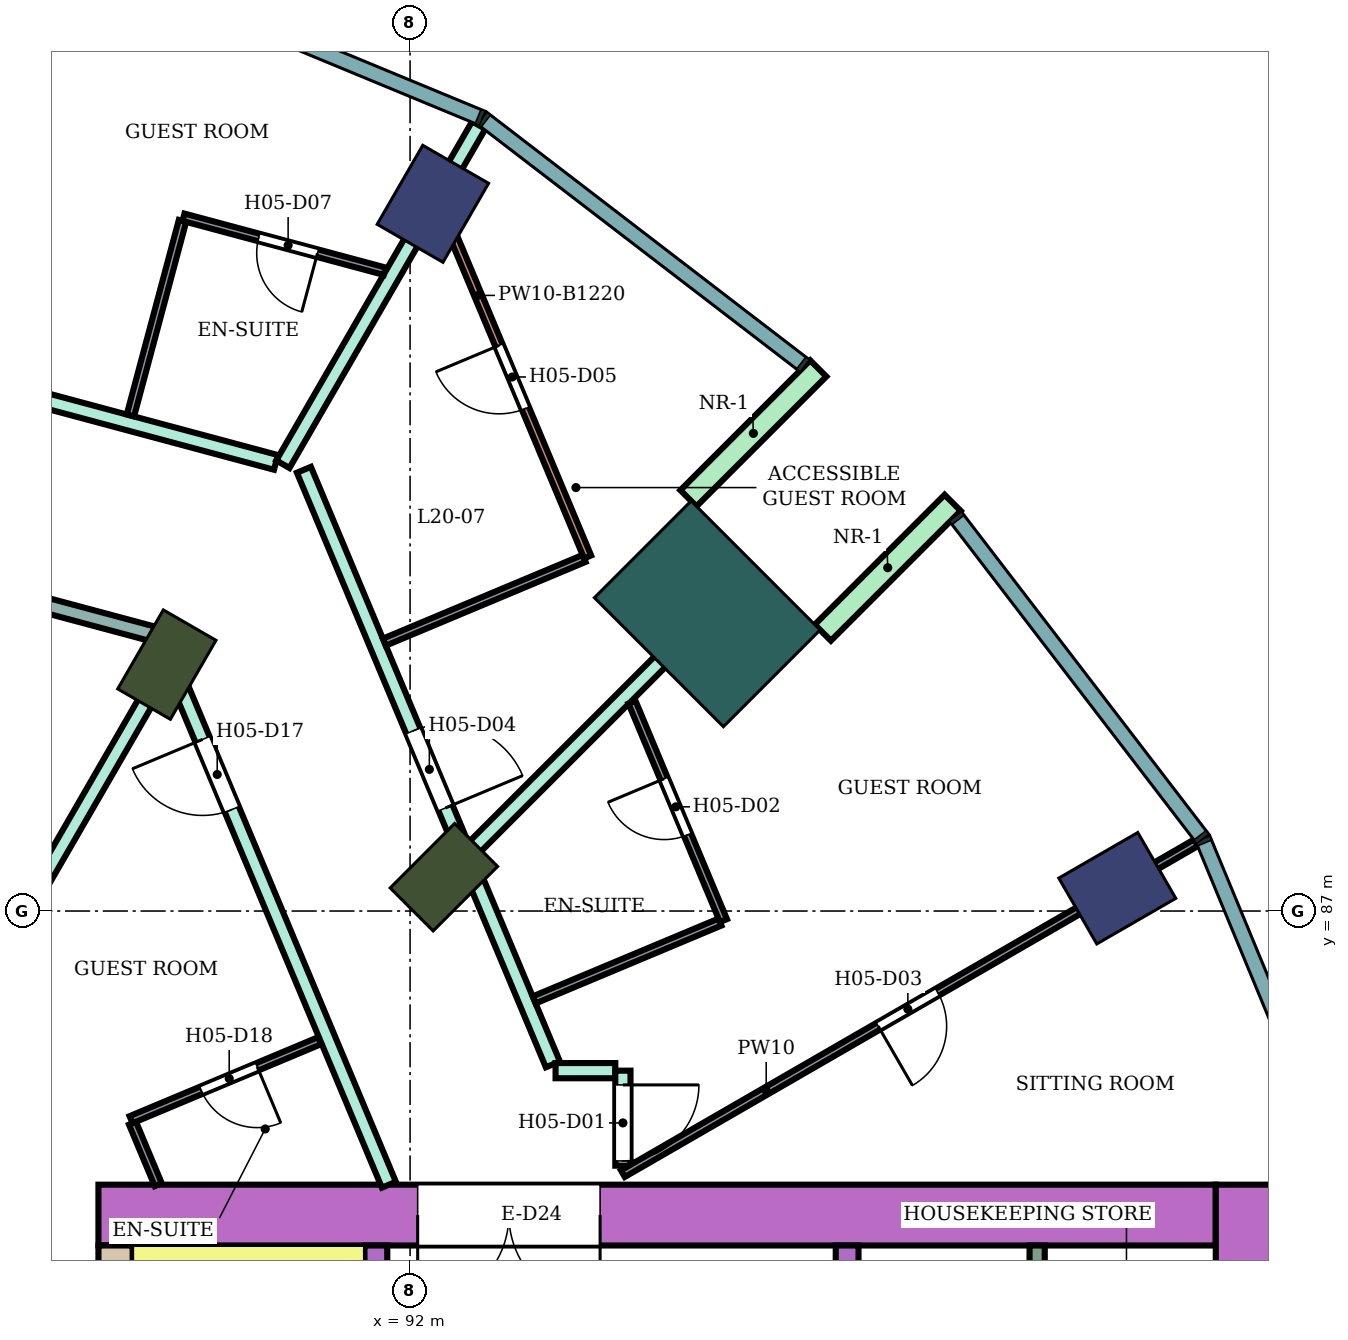
"""IFC4 building model, lengths in metres.
Left out: names, types, materials, properties, quantities, classifications, styles, units other than length and angle.
Written with IfcOpenShell. Run it as: python <this file> out.ifc"""

import sys

from ifc_helpers import new_model, si_unit, direction, frame, frame_2d, origin, origin_2d, place, context, subcontext, project, spatial, rectangle, extrude, element, fill, save


model = new_model("IFC4")
c1 = context("Model", 3, precision=1e-05, world=origin(), true_north=direction((0.0, 1.0)))
c2 = subcontext(c1, "Body", "Model", "MODEL_VIEW")
j1 = project(units=[si_unit("LENGTHUNIT", "METRE"), si_unit("PLANEANGLEUNIT", "RADIAN")], contexts=[c1])
p1 = place(None, origin())
s1 = spatial("IfcSite", under=j1, at=p1, CompositionType="ELEMENT")
p2 = place(p1, origin())
s2 = spatial("IfcBuilding", under=s1, at=p2, CompositionType="ELEMENT")
p3 = place(p2, frame((0.0, 0.0, 90.0)))
s3 = spatial("IfcBuildingStorey", under=s2, at=p3, CompositionType="ELEMENT", Elevation=90.0)
for number, where, z_axis, x_axis in (
    (1, (101.304, 87.3, 0.0), (0.0, 0.0, 1.0), (0.866, 0.5, 0.0)),
    (2, (92.3, 96.304, 0.0), (0.0, 0.0, 1.0), (0.5, 0.866, 0.0)),
):
    element("IfcColumn", number, at=place(p3, frame(where, z_axis=z_axis, x_axis=x_axis)), inside=s3, PredefinedType="COLUMN", context=c2, shape_type="SweptSolid", body=[
        extrude(rectangle(XDim=1.2, YDim=1.0, at=origin_2d()), origin(), (0.0, 0.0, 1.0), 3.8),
    ])
for number, where, z_axis, x_axis in (
    (3, (92.445, 87.445, 0.0), (0.0, 0.0, 1.0), (0.707, 0.707, 0.0)),
    (4, (88.8, 90.242, 0.0), (0.0, 0.0, 1.0), (0.5, 0.866, 0.0)),
):
    element("IfcColumn", number, at=place(p3, frame(where, z_axis=z_axis, x_axis=x_axis)), inside=s3, PredefinedType="COLUMN", context=c2, shape_type="SweptSolid", body=[
        extrude(rectangle(XDim=1.2, YDim=0.8, at=origin_2d()), origin(), (0.0, 0.0, 1.0), 3.8),
    ])
p4 = place(p3, frame((95.91, 90.91, 0.0), z_axis=(0.0, 0.0, 1.0), x_axis=(0.707106781187, 0.707106781187, 0.0)))
e5 = element("IfcColumn", 5, at=p4, inside=s3, PredefinedType="COLUMN", context=c2, shape_type="SweptSolid", body=[
    extrude(rectangle(XDim=1.8, YDim=2.4, at=origin_2d()), origin(), (0.0, 0.0, 1.0), 3.8),
])
p5 = place(p3, frame((87.9, 83.0, 0.0), z_axis=(0.0, 0.0, 1.0), x_axis=(1.0, 0.0, 0.0)))
e6 = element("IfcWall", 6, at=p5, inside=s3, PredefinedType="SHEAR", context=c2, shape_type="SweptSolid", body=[
    extrude(rectangle(XDim=14.7, YDim=0.8, at=frame_2d((7.35, 0.0))), origin(), (0.0, 0.0, 1.0), 3.48),
])
p6 = place(p5, frame((4.2, 0.0, 0.0)))
e7 = element("IfcOpeningElement", 7, at=p6, cuts=e6, PredefinedType="OPENING", context=c2, shape_type="SweptSolid", body=[
    extrude(rectangle(XDim=2.4, YDim=2.4, at=frame_2d((1.2, 1.2))), frame((0.0, 0.41, 0.0), z_axis=(0.0, -1.0, 0.0), x_axis=(1.0, 0.0, 0.0)), (0.0, 0.0, 1.0), 0.82),
])
p7 = place(p3, frame((88.125, 75.0, 0.0), z_axis=(0.0, 0.0, 1.0), x_axis=(0.0, 1.0, 0.0)))
e8 = element("IfcWall", 8, at=p7, inside=s3, PredefinedType="SHEAR", context=c2, shape_type="SweptSolid", body=[
    extrude(rectangle(XDim=7.6, YDim=0.45, at=frame_2d((3.8, 0.0))), origin(), (0.0, 0.0, 1.0), 3.48),
])
p8 = place(p3, frame((103.0, 66.6, 0.0), z_axis=(0.0, 0.0, 1.0), x_axis=(0.0, 1.0, 0.0)))
e9 = element("IfcWall", 9, at=p8, inside=s3, PredefinedType="SHEAR", context=c2, shape_type="SweptSolid", body=[
    extrude(rectangle(XDim=16.8, YDim=0.8, at=frame_2d((8.4, 0.0))), origin(), (0.0, 0.0, 1.0), 3.48),
])
p9 = place(p3, frame((91.55, 75.0, 0.0), z_axis=(0.0, 0.0, 1.0), x_axis=(0.0, 1.0, 0.0)))
e10 = element("IfcWall", 10, at=p9, inside=s3, PredefinedType="SHEAR", context=c2, shape_type="SweptSolid", body=[
    extrude(rectangle(XDim=7.6, YDim=0.3, at=frame_2d((3.8, 0.0))), origin(), (0.0, 0.0, 1.0), 3.48),
])
p10 = place(p9, frame((1.85, 0.0, 0.0)))
e11 = element("IfcOpeningElement", 11, at=p10, cuts=e10, PredefinedType="OPENING", context=c2, shape_type="SweptSolid", body=[
    extrude(rectangle(XDim=0.9, YDim=2.1, at=frame_2d((0.45, 1.05))), frame((0.0, 0.16, 0.0), z_axis=(0.0, -1.0, 0.0), x_axis=(1.0, 0.0, 0.0)), (0.0, 0.0, 1.0), 0.32),
])
p11 = place(p3, frame((97.75, 78.75, 0.0), z_axis=(0.0, 0.0, 1.0), x_axis=(0.0, 1.0, 0.0)))
e12 = element("IfcWall", 12, at=p11, inside=s3, PredefinedType="SHEAR", context=c2, shape_type="SweptSolid", body=[
    extrude(rectangle(XDim=3.85, YDim=0.3, at=frame_2d((1.925, 0.0))), origin(), (0.0, 0.0, 1.0), 3.48),
])
for number, where, z_axis, x_axis in (
    (13, (97.43, 90.662, 0.0), (0.0, 0.0, 1.0), (0.707, 0.707, 0.0)),
    (14, (95.662, 92.43, 0.0), (0.0, 0.0, 1.0), (0.707, 0.707, 0.0)),
):
    element("IfcWall", number, at=place(p3, frame(where, z_axis=z_axis, x_axis=x_axis)), inside=s3, PredefinedType="NOTDEFINED", context=c2, shape_type="SweptSolid", body=[
        extrude(rectangle(XDim=2.416, YDim=0.3, at=frame_2d((1.208, 0.0))), origin(), (0.0, 0.0, 1.0), 3.8),
    ])
p12 = place(p3, frame((80.0, 92.954, 0.0), z_axis=(0.0, 0.0, 1.0), x_axis=(0.965932194462, -0.258795277586, 0.0)))
e15 = element("IfcWall", 15, at=p12, inside=s3, PredefinedType="PARTITIONING", context=c2, shape_type="SweptSolid", body=[
    extrude(rectangle(XDim=8.934, YDim=0.2, at=frame_2d((4.467, 0.0))), origin(), (0.0, 0.0, 1.0), 2.98),
])
p13 = place(p12, frame((3.302, 0.0, 0.0)))
e16 = element("IfcOpeningElement", 16, at=p13, cuts=e15, PredefinedType="OPENING", context=c2, shape_type="SweptSolid", body=[
    extrude(rectangle(XDim=0.9, YDim=2.1, at=frame_2d((0.45, 1.05))), frame((0.0, 0.11, 0.0), z_axis=(0.0, -1.0, 0.0), x_axis=(1.0, 0.0, 0.0)), (0.0, 0.0, 1.0), 0.22),
])
p14 = place(p3, frame((80.0, 95.648, 0.0), z_axis=(0.0, 0.0, 1.0), x_axis=(0.965852259202, -0.259093445292, 0.0)))
e17 = element("IfcWall", 17, at=p14, inside=s3, PredefinedType="PARTITIONING", context=c2, shape_type="SweptSolid", body=[
    extrude(rectangle(XDim=10.597, YDim=0.2, at=frame_2d((5.298, 0.0))), origin(), (0.0, 0.0, 1.0), 3.35),
])
p15 = place(p14, frame((5.875, 0.0, 0.0)))
e18 = element("IfcOpeningElement", 18, at=p15, cuts=e17, PredefinedType="OPENING", context=c2, shape_type="SweptSolid", body=[
    extrude(rectangle(XDim=1.0, YDim=2.1, at=frame_2d((0.5, 1.05))), frame((0.0, 0.11, 0.0), z_axis=(0.0, -1.0, 0.0), x_axis=(1.0, 0.0, 0.0)), (0.0, 0.0, 1.0), 0.22),
])
p16 = place(p3, frame((83.85, 81.667, 0.0), z_axis=(0.0, 0.0, 1.0), x_axis=(0.500222212082, 0.865897071562, 0.0)))
e19 = element("IfcWall", 19, at=p16, inside=s3, PredefinedType="PARTITIONING", context=c2, shape_type="SweptSolid", body=[
    extrude(rectangle(XDim=9.768, YDim=0.2, at=frame_2d((4.884, 0.0))), origin(), (0.0, 0.0, 1.0), 3.35),
])
p17 = place(p3, frame((88.698, 90.624, 0.0), z_axis=(0.0, 0.0, 1.0), x_axis=(0.386027055918, -0.922487459047, 0.0)))
e20 = element("IfcWall", 20, at=p17, inside=s3, PredefinedType="PARTITIONING", context=c2, shape_type="SweptSolid", body=[
    extrude(rectangle(XDim=7.832, YDim=0.2, at=frame_2d((3.916, 0.0))), origin(), (0.0, 0.0, 1.0), 3.35),
])
p18 = place(p17, frame((1.482, 0.0, 0.0)))
e21 = element("IfcOpeningElement", 21, at=p18, cuts=e20, PredefinedType="OPENING", context=c2, shape_type="SweptSolid", body=[
    extrude(rectangle(XDim=1.0, YDim=2.1, at=frame_2d((0.5, 1.05))), frame((0.0, 0.11, 0.0), z_axis=(0.0, -1.0, 0.0), x_axis=(1.0, 0.0, 0.0)), (0.0, 0.0, 1.0), 0.22),
])
p19 = place(p3, frame((90.327, 92.878, 0.0), z_axis=(0.0, 0.0, 1.0), x_axis=(0.50022153717, 0.865897461453, 0.0)))
e22 = element("IfcWall", 22, at=p19, inside=s3, PredefinedType="PARTITIONING", context=c2, shape_type="SweptSolid", body=[
    extrude(rectangle(XDim=5.152, YDim=0.2, at=frame_2d((2.576, 0.0))), origin(), (0.0, 0.0, 1.0), 3.35),
])
p20 = place(p3, frame((90.604, 92.805, 0.0), z_axis=(0.0, 0.0, 1.0), x_axis=(0.386209298583, -0.922411176042, 0.0)))
e23 = element("IfcWall", 23, at=p20, inside=s3, PredefinedType="PARTITIONING", context=c2, shape_type="SweptSolid", body=[
    extrude(rectangle(XDim=8.48, YDim=0.2, at=frame_2d((4.24, 0.0))), origin(), (0.0, 0.0, 1.0), 3.35),
])
p21 = place(p20, frame((3.723, 0.0, 0.0)))
e24 = element("IfcOpeningElement", 24, at=p21, cuts=e23, PredefinedType="OPENING", context=c2, shape_type="SweptSolid", body=[
    extrude(rectangle(XDim=1.1, YDim=2.1, at=frame_2d((0.55, 1.05))), frame((0.0, 0.11, 0.0), z_axis=(0.0, -1.0, 0.0), x_axis=(1.0, 0.0, 0.0)), (0.0, 0.0, 1.0), 0.22),
])
p22 = place(p3, frame((92.832, 87.824, 0.0), z_axis=(0.0, 0.0, 1.0), x_axis=(0.707251566381, 0.70696196634, 0.0)))
e25 = element("IfcWall", 25, at=p22, inside=s3, PredefinedType="PARTITIONING", context=c2, shape_type="SweptSolid", body=[
    extrude(rectangle(XDim=5.058, YDim=0.2, at=frame_2d((2.529, 0.0))), origin(), (0.0, 0.0, 1.0), 3.35),
])
p23 = place(p3, frame((93.914, 84.9, 0.0), z_axis=(0.0, 0.0, 1.0), x_axis=(1.0, 0.0, 0.0)))
e26 = element("IfcWall", 26, at=p23, inside=s3, PredefinedType="PARTITIONING", context=c2, shape_type="SweptSolid", body=[
    extrude(rectangle(XDim=0.786, YDim=0.2, at=frame_2d((0.393, 0.0))), origin(), (0.0, 0.0, 1.0), 3.35),
])
p24 = place(p3, frame((94.8, 83.65, 0.0), z_axis=(0.0, 0.0, 1.0), x_axis=(0.0, 1.0, 0.0)))
e27 = element("IfcWall", 27, at=p24, inside=s3, PredefinedType="PARTITIONING", context=c2, shape_type="SweptSolid", body=[
    extrude(rectangle(XDim=1.25, YDim=0.2, at=frame_2d((0.625, 0.0))), origin(), (0.0, 0.0, 1.0), 3.35),
])
p25 = place(p24, frame((0.062, 0.0, 0.0)))
e28 = element("IfcOpeningElement", 28, at=p25, cuts=e27, PredefinedType="OPENING", context=c2, shape_type="SweptSolid", body=[
    extrude(rectangle(XDim=1.0, YDim=2.1, at=frame_2d((0.5, 1.05))), frame((0.0, 0.11, 0.0), z_axis=(0.0, -1.0, 0.0), x_axis=(1.0, 0.0, 0.0)), (0.0, 0.0, 1.0), 0.22),
])
p26 = place(p3, frame((88.321, 93.521, 0.0), z_axis=(0.0, 0.0, 1.0), x_axis=(0.258677737588, 0.965963678446, 0.0)))
e29 = element("IfcWall", 29, at=p26, inside=s3, PredefinedType="PARTITIONING", context=c2, shape_type="SweptSolid", body=[
    extrude(rectangle(XDim=2.649, YDim=0.1, at=frame_2d((1.325, 0.0))), origin(), (0.0, 0.0, 1.0), 3.35),
])
p27 = place(p3, frame((88.348, 84.209, 0.0), z_axis=(0.0, 0.0, 1.0), x_axis=(0.386077497504, -0.922466349479, 0.0)))
e30 = element("IfcWall", 30, at=p27, inside=s3, PredefinedType="PARTITIONING", context=c2, shape_type="SweptSolid", body=[
    extrude(rectangle(XDim=0.877, YDim=0.1, at=frame_2d((0.438, 0.0))), origin(), (0.0, 0.0, 1.0), 3.35),
])
p28 = place(p3, frame((88.329, 84.255, 0.0), z_axis=(0.0, 0.0, 1.0), x_axis=(0.922320663728, 0.386425404522, 0.0)))
e31 = element("IfcWall", 31, at=p28, inside=s3, PredefinedType="PARTITIONING", context=c2, shape_type="SweptSolid", body=[
    extrude(rectangle(XDim=2.69, YDim=0.1, at=frame_2d((1.345, 0.0))), origin(), (0.0, 0.0, 1.0), 3.35),
])
p29 = place(p28, frame((1.0, 0.0, 0.0)))
e32 = element("IfcOpeningElement", 32, at=p29, cuts=e31, PredefinedType="OPENING", context=c2, shape_type="SweptSolid", body=[
    extrude(rectangle(XDim=0.8, YDim=2.1, at=frame_2d((0.4, 1.05))), frame((0.0, 0.06, 0.0), z_axis=(0.0, -1.0, 0.0), x_axis=(1.0, 0.0, 0.0)), (0.0, 0.0, 1.0), 0.12),
])
p30 = place(p3, frame((89.019, 96.127, 0.0), z_axis=(0.0, 0.0, 1.0), x_axis=(0.965839030583, -0.259142754101, 0.0)))
e33 = element("IfcWall", 33, at=p30, inside=s3, PredefinedType="PARTITIONING", context=c2, shape_type="SweptSolid", body=[
    extrude(rectangle(XDim=2.74, YDim=0.1, at=frame_2d((1.37, 0.0))), origin(), (0.0, 0.0, 1.0), 3.35),
])
p31 = place(p30, frame((1.026, 0.0, 0.0)))
e34 = element("IfcOpeningElement", 34, at=p31, cuts=e33, PredefinedType="OPENING", context=c2, shape_type="SweptSolid", body=[
    extrude(rectangle(XDim=0.8, YDim=2.1, at=frame_2d((0.4, 1.05))), frame((0.0, 0.06, 0.0), z_axis=(0.0, -1.0, 0.0), x_axis=(1.0, 0.0, 0.0)), (0.0, 0.0, 1.0), 0.12),
])
p32 = place(p3, frame((91.661, 90.538, 0.0), z_axis=(0.0, 0.0, 1.0), x_axis=(0.922352973625, 0.386348278169, 0.0)))
e35 = element("IfcWall", 35, at=p32, inside=s3, PredefinedType="PARTITIONING", context=c2, shape_type="SweptSolid", body=[
    extrude(rectangle(XDim=2.85, YDim=0.1, at=frame_2d((1.425, 0.0))), origin(), (0.0, 0.0, 1.0), 3.35),
])
p33 = place(p3, frame((92.414, 96.246, 0.0), z_axis=(0.0, 0.0, 1.0), x_axis=(0.386353683992, -0.922350709256, 0.0)))
e36 = element("IfcWall", 36, at=p33, inside=s3, PredefinedType="PARTITIONING", context=c2, shape_type="SweptSolid", body=[
    extrude(rectangle(XDim=4.974, YDim=0.1, at=frame_2d((2.487, 0.0))), origin(), (0.0, 0.0, 1.0), 2.58),
])
p34 = place(p33, frame((1.957, 0.0, 0.0)))
e37 = element("IfcOpeningElement", 37, at=p34, cuts=e36, PredefinedType="OPENING", context=c2, shape_type="SweptSolid", body=[
    extrude(rectangle(XDim=0.9, YDim=2.1, at=frame_2d((0.45, 1.05))), frame((0.0, 0.06, 0.0), z_axis=(0.0, -1.0, 0.0), x_axis=(1.0, 0.0, 0.0)), (0.0, 0.0, 1.0), 0.12),
])
p35 = place(p3, frame((93.633, 85.831, 0.0), z_axis=(0.0, 0.0, 1.0), x_axis=(0.922344808264, 0.38636777126, 0.0)))
e38 = element("IfcWall", 38, at=p35, inside=s3, PredefinedType="PARTITIONING", context=c2, shape_type="SweptSolid", body=[
    extrude(rectangle(XDim=2.65, YDim=0.1, at=frame_2d((1.325, 0.0))), origin(), (0.0, 0.0, 1.0), 3.35),
])
p36 = place(p3, frame((94.8, 83.545, 0.0), z_axis=(0.0, 0.0, 1.0), x_axis=(0.86602264145, 0.500004784474, 0.0)))
e39 = element("IfcWall", 39, at=p36, inside=s3, PredefinedType="PARTITIONING", context=c2, shape_type="SweptSolid", body=[
    extrude(rectangle(XDim=8.708, YDim=0.1, at=frame_2d((4.354, 0.0))), origin(), (0.0, 0.0, 1.0), 3.35),
])
p37 = place(p36, frame((3.879, 0.0, 0.0)))
e40 = element("IfcOpeningElement", 40, at=p37, cuts=e39, PredefinedType="OPENING", context=c2, shape_type="SweptSolid", body=[
    extrude(rectangle(XDim=0.9, YDim=2.1, at=frame_2d((0.45, 1.05))), frame((0.0, 0.06, 0.0), z_axis=(0.0, -1.0, 0.0), x_axis=(1.0, 0.0, 0.0)), (0.0, 0.0, 1.0), 0.12),
])
p38 = place(p3, frame((94.919, 89.748, 0.0), z_axis=(0.0, 0.0, 1.0), x_axis=(0.38635048828, -0.922352047868, 0.0)))
e41 = element("IfcWall", 41, at=p38, inside=s3, PredefinedType="PARTITIONING", context=c2, shape_type="SweptSolid", body=[
    extrude(rectangle(XDim=3.116, YDim=0.1, at=frame_2d((1.558, 0.0))), origin(), (0.0, 0.0, 1.0), 3.35),
])
p39 = place(p38, frame((1.093, 0.0, 0.0)))
e42 = element("IfcOpeningElement", 42, at=p39, cuts=e41, PredefinedType="OPENING", context=c2, shape_type="SweptSolid", body=[
    extrude(rectangle(XDim=0.8, YDim=2.1, at=frame_2d((0.4, 1.05))), frame((0.0, 0.06, 0.0), z_axis=(0.0, -1.0, 0.0), x_axis=(1.0, 0.0, 0.0)), (0.0, 0.0, 1.0), 0.12),
])
p40 = place(p3, frame((100.25, 79.05, 0.0), z_axis=(0.0, 0.0, 1.0), x_axis=(0.0, 1.0, 0.0)))
e43 = element("IfcWall", 43, at=p40, inside=s3, PredefinedType="PARTITIONING", context=c2, shape_type="SweptSolid", body=[
    extrude(rectangle(XDim=3.55, YDim=0.2, at=frame_2d((1.775, 0.0))), origin(), (0.0, 0.0, 1.0), 3.48),
])
p41 = place(p25, frame((1.0, 0.0, 0.0), z_axis=(0.0, 0.0, 1.0), x_axis=(-1.0, 0.0, 0.0)))
e44 = element("IfcDoor", 44, at=p41, inside=s3, OperationType="SINGLE_SWING_LEFT", PredefinedType="DOOR", context=c2, shape_type="SweptSolid", body=[
    extrude(rectangle(XDim=1.0, YDim=2.1, at=frame_2d((0.5, 1.05))), frame((0.0, 0.025, 0.0), z_axis=(0.0, -1.0, 0.0), x_axis=(1.0, 0.0, 0.0)), (0.0, 0.0, 1.0), 0.05),
])
fill(e28, e44)
p42 = place(p39, frame((0.8, 0.0, 0.0), z_axis=(0.0, 0.0, 1.0), x_axis=(-1.0, 0.0, 0.0)))
e45 = element("IfcDoor", 45, at=p42, inside=s3, OperationType="SINGLE_SWING_RIGHT", PredefinedType="DOOR", context=c2, shape_type="SweptSolid", body=[
    extrude(rectangle(XDim=0.8, YDim=2.1, at=frame_2d((0.4, 1.05))), frame((0.0, 0.025, 0.0), z_axis=(0.0, -1.0, 0.0), x_axis=(1.0, 0.0, 0.0)), (0.0, 0.0, 1.0), 0.05),
])
fill(e42, e45)
p43 = place(p37, frame((0.9, 0.0, 0.0), z_axis=(0.0, 0.0, 1.0), x_axis=(-1.0, 0.0, 0.0)))
e46 = element("IfcDoor", 46, at=p43, inside=s3, OperationType="SINGLE_SWING_RIGHT", PredefinedType="DOOR", context=c2, shape_type="SweptSolid", body=[
    extrude(rectangle(XDim=0.9, YDim=2.1, at=frame_2d((0.45, 1.05))), frame((0.0, 0.025, 0.0), z_axis=(0.0, -1.0, 0.0), x_axis=(1.0, 0.0, 0.0)), (0.0, 0.0, 1.0), 0.05),
])
fill(e40, e46)
p44 = place(p21, origin())
e47 = element("IfcDoor", 47, at=p44, inside=s3, OperationType="SINGLE_SWING_RIGHT", PredefinedType="DOOR", context=c2, shape_type="SweptSolid", body=[
    extrude(rectangle(XDim=1.1, YDim=2.1, at=frame_2d((0.55, 1.05))), frame((0.0, 0.025, 0.0), z_axis=(0.0, -1.0, 0.0), x_axis=(1.0, 0.0, 0.0)), (0.0, 0.0, 1.0), 0.05),
])
fill(e24, e47)
p45 = place(p34, frame((0.9, 0.0, 0.0), z_axis=(0.0, 0.0, 1.0), x_axis=(-1.0, 0.0, 0.0)))
e48 = element("IfcDoor", 48, at=p45, inside=s3, OperationType="SINGLE_SWING_RIGHT", PredefinedType="DOOR", context=c2, shape_type="SweptSolid", body=[
    extrude(rectangle(XDim=0.9, YDim=2.1, at=frame_2d((0.45, 1.05))), frame((0.0, 0.025, 0.0), z_axis=(0.0, -1.0, 0.0), x_axis=(1.0, 0.0, 0.0)), (0.0, 0.0, 1.0), 0.05),
])
fill(e37, e48)
p46 = place(p31, frame((0.8, 0.0, 0.0), z_axis=(0.0, 0.0, 1.0), x_axis=(-1.0, 0.0, 0.0)))
e49 = element("IfcDoor", 49, at=p46, inside=s3, OperationType="SINGLE_SWING_LEFT", PredefinedType="DOOR", context=c2, shape_type="SweptSolid", body=[
    extrude(rectangle(XDim=0.8, YDim=2.1, at=frame_2d((0.4, 1.05))), frame((0.0, 0.025, 0.0), z_axis=(0.0, -1.0, 0.0), x_axis=(1.0, 0.0, 0.0)), (0.0, 0.0, 1.0), 0.05),
])
fill(e34, e49)
p47 = place(p18, frame((1.0, 0.0, 0.0), z_axis=(0.0, 0.0, 1.0), x_axis=(-1.0, 0.0, 0.0)))
e50 = element("IfcDoor", 50, at=p47, inside=s3, OperationType="SINGLE_SWING_RIGHT", PredefinedType="DOOR", context=c2, shape_type="SweptSolid", body=[
    extrude(rectangle(XDim=1.0, YDim=2.1, at=frame_2d((0.5, 1.05))), frame((0.0, 0.025, 0.0), z_axis=(0.0, -1.0, 0.0), x_axis=(1.0, 0.0, 0.0)), (0.0, 0.0, 1.0), 0.05),
])
fill(e21, e50)
p48 = place(p29, frame((0.8, 0.0, 0.0), z_axis=(0.0, 0.0, 1.0), x_axis=(-1.0, 0.0, 0.0)))
e51 = element("IfcDoor", 51, at=p48, inside=s3, OperationType="SINGLE_SWING_LEFT", PredefinedType="DOOR", context=c2, shape_type="SweptSolid", body=[
    extrude(rectangle(XDim=0.8, YDim=2.1, at=frame_2d((0.4, 1.05))), frame((0.0, 0.025, 0.0), z_axis=(0.0, -1.0, 0.0), x_axis=(1.0, 0.0, 0.0)), (0.0, 0.0, 1.0), 0.05),
])
fill(e32, e51)
p49 = place(p6, frame((2.4, 0.0, 0.0), z_axis=(0.0, 0.0, 1.0), x_axis=(-1.0, 0.0, 0.0)))
e52 = element("IfcDoor", 52, at=p49, inside=s3, OperationType="DOUBLE_DOOR_SINGLE_SWING", PredefinedType="DOOR", context=c2, shape_type="SweptSolid", body=[
    extrude(rectangle(XDim=2.4, YDim=2.4, at=frame_2d((1.2, 1.2))), frame((0.0, 0.025, 0.0), z_axis=(0.0, -1.0, 0.0), x_axis=(1.0, 0.0, 0.0)), (0.0, 0.0, 1.0), 0.05),
])
fill(e7, e52)
save(model, sys.argv[1])
